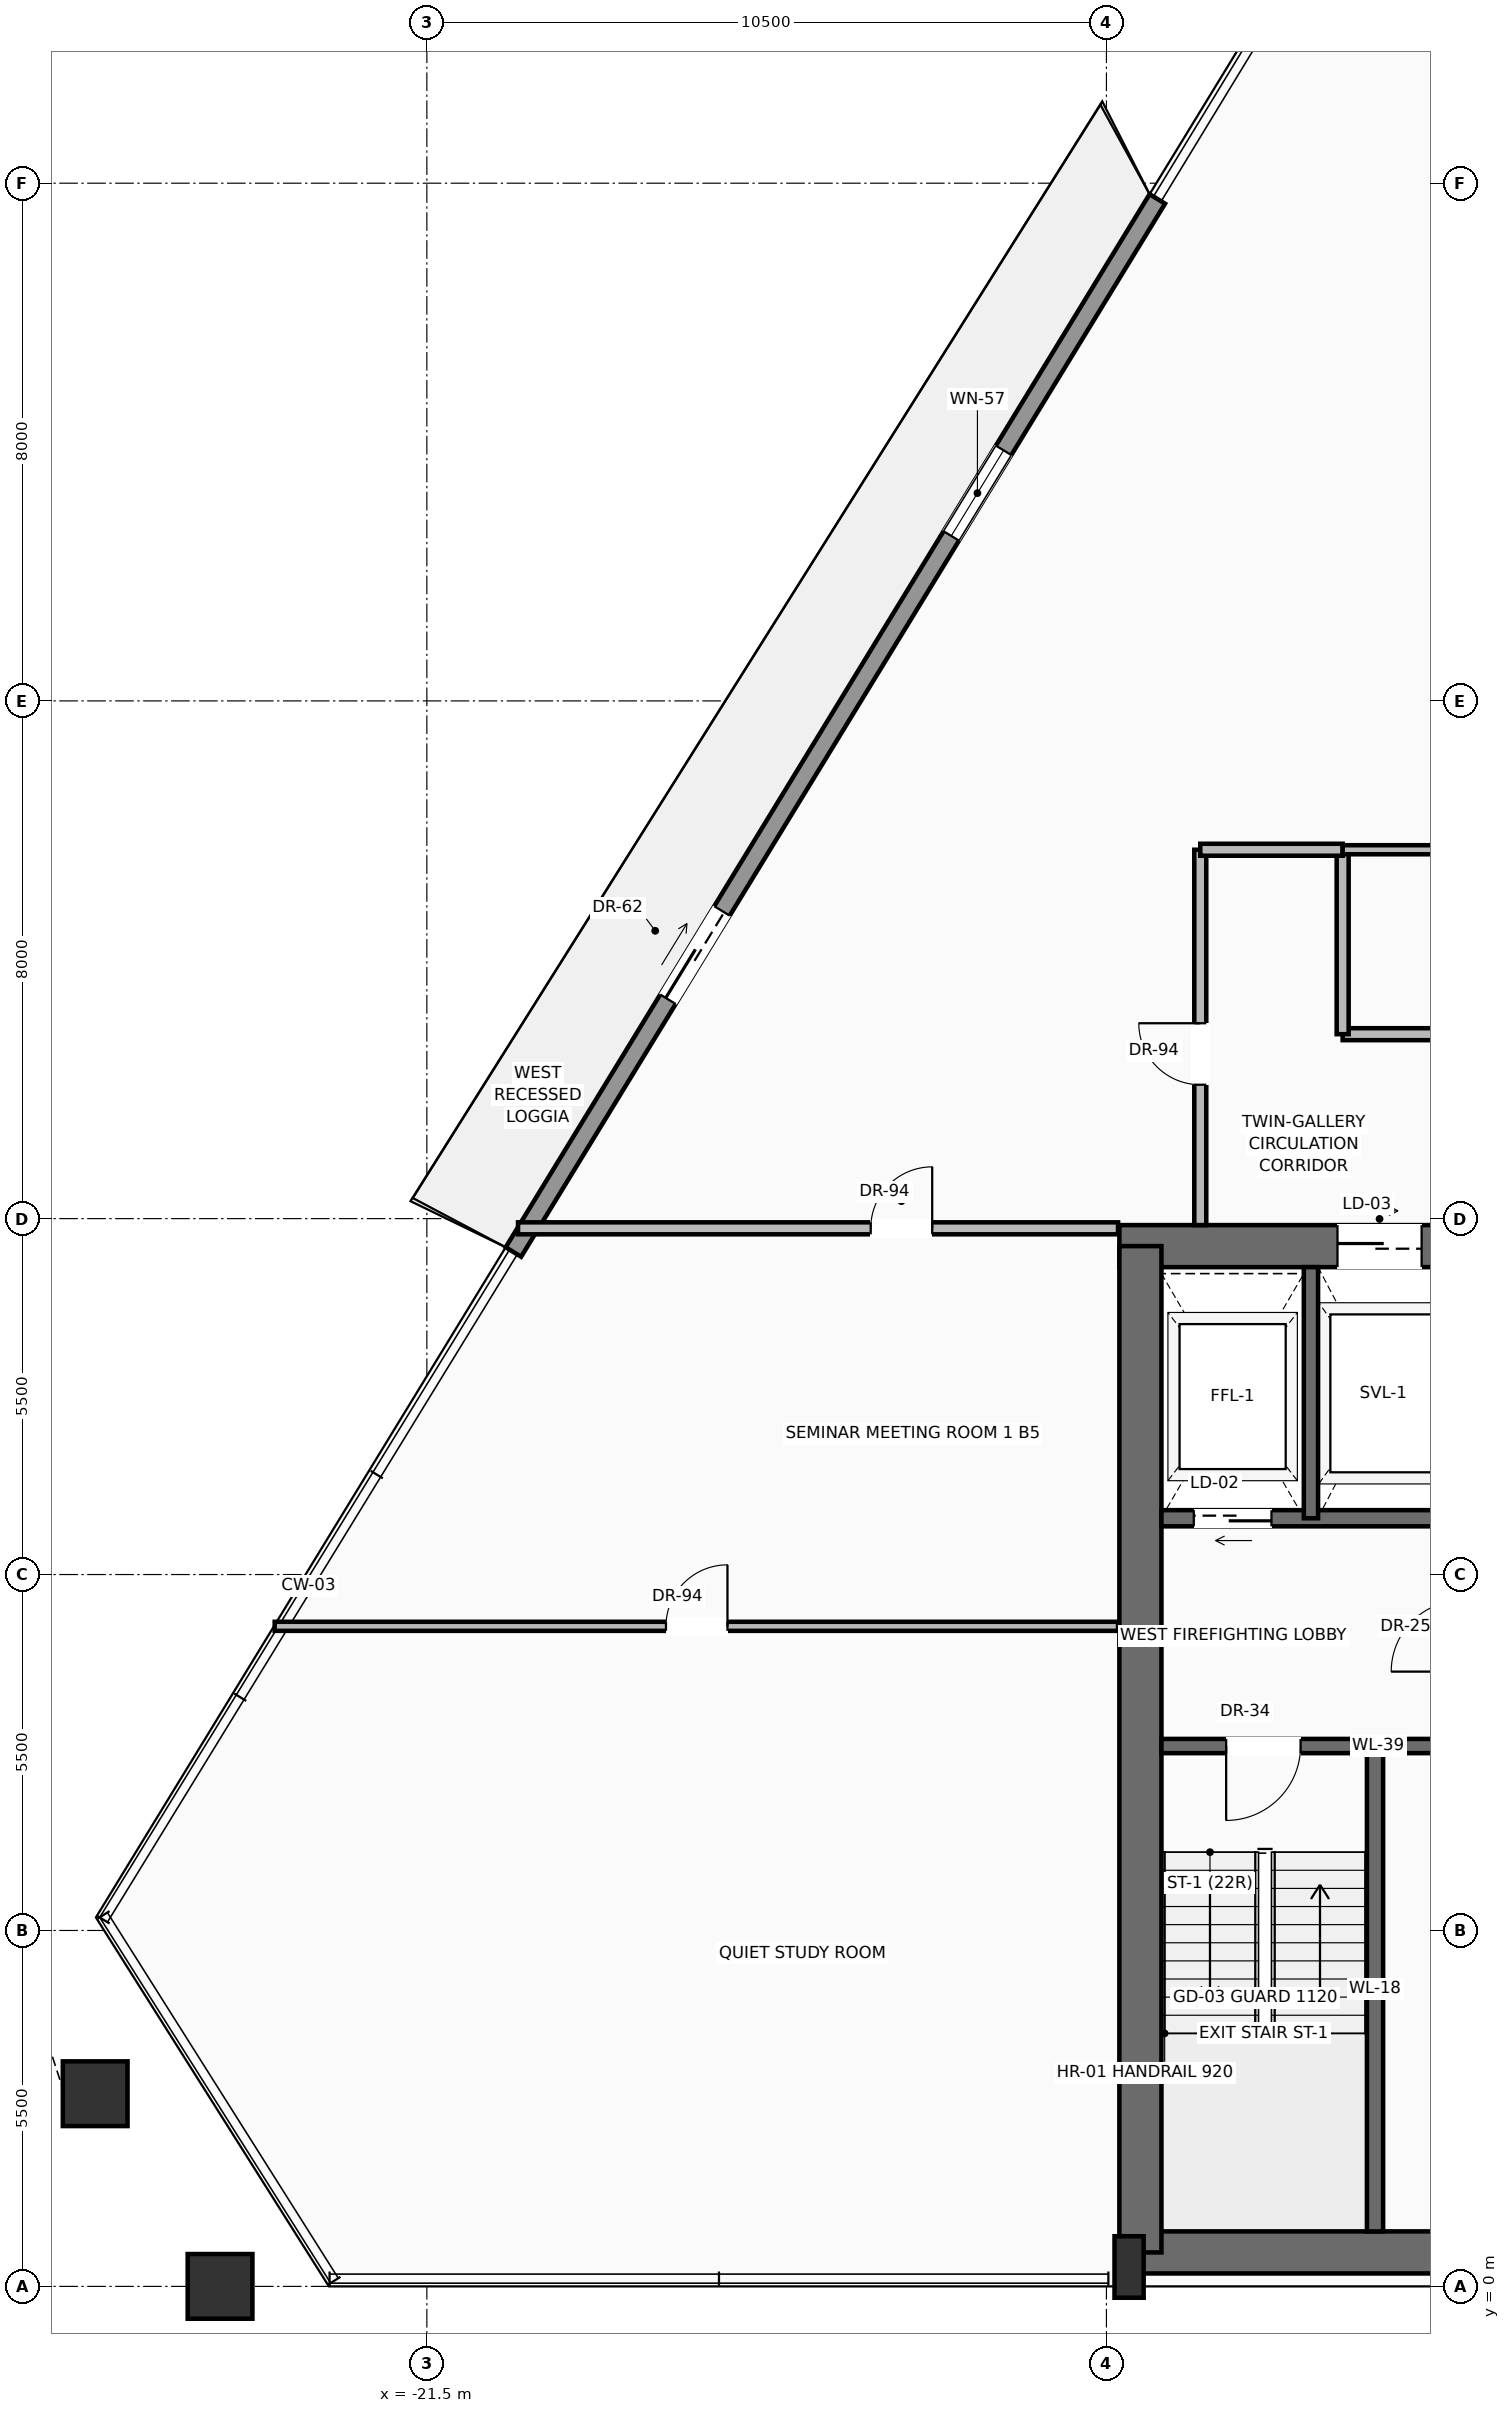
"""IFC4 building model, lengths in metres.
Left out: names, types, materials, properties, quantities, classifications, styles, units other than length and angle.
Written with IfcOpenShell. Run it as: python <this file> out.ifc"""

import sys

from ifc_helpers import new_model, si_unit, direction, frame, frame_2d, origin, origin_2d, place, context, subcontext, project, spatial, rectangle, hollow_rectangle, extrude, source, transform, mapped, element, fill, save


model = new_model("IFC4")
c1 = context("Model", 3, precision=1e-05, world=origin(), true_north=direction((0.0, 1.0)))
c2 = subcontext(c1, "Body", "Model", "MODEL_VIEW")
j1 = project(units=[si_unit("LENGTHUNIT", "METRE"), si_unit("PLANEANGLEUNIT", "RADIAN")], contexts=[c1])
p1 = place(None, origin())
s1 = spatial("IfcSite", under=j1, at=p1, CompositionType="ELEMENT")
p2 = place(p1, origin())
s2 = spatial("IfcBuilding", under=s1, at=p2, CompositionType="ELEMENT")
p3 = place(p2, frame((0.0, 0.0, 200.6)))
s3 = spatial("IfcBuildingStorey", under=s2, at=p3, CompositionType="ELEMENT", Elevation=200.6)
p4 = place(p3, frame((-10.65, 0.525, 0.0), z_axis=(0.0, 0.0, 1.0), x_axis=(1.0, 0.0, 0.0)))
e1 = element("IfcWall", 1, at=p4, inside=s3, PredefinedType="SHEAR", context=c2, shape_type="SweptSolid", body=[
    extrude(rectangle(XDim=21.3, YDim=0.65, at=frame_2d((10.65, 0.0))), origin(), (0.0, 0.0, 1.0), 3.47),
])
p5 = place(p3, frame((-10.8, 16.075, 0.0), z_axis=(0.0, 0.0, 1.0), x_axis=(1.0, 0.0, 0.0)))
e2 = element("IfcWall", 2, at=p5, inside=s3, PredefinedType="SHEAR", context=c2, shape_type="SweptSolid", body=[
    extrude(rectangle(XDim=21.6, YDim=0.65, at=frame_2d((10.8, 0.0))), origin(), (0.0, 0.0, 1.0), 3.47),
])
p6 = place(p5, frame((3.37, 0.0, 0.0)))
e3 = element("IfcOpeningElement", 3, at=p6, cuts=e2, PredefinedType="OPENING", context=c2, shape_type="SweptSolid", body=[
    extrude(rectangle(XDim=1.3, YDim=2.3, at=frame_2d((0.65, 1.15))), frame((0.0, 0.335, 0.0), z_axis=(0.0, -1.0, 0.0), x_axis=(1.0, 0.0, 0.0)), (0.0, 0.0, 1.0), 0.67),
])
p7 = place(p5, frame((9.8, 0.0, 0.0)))
e4 = element("IfcOpeningElement", 4, at=p7, cuts=e2, PredefinedType="OPENING", context=c2, shape_type="SweptSolid", body=[
    extrude(rectangle(XDim=2.0, YDim=2.4, at=frame_2d((1.0, 1.2))), frame((0.0, 0.335, 0.0), z_axis=(0.0, -1.0, 0.0), x_axis=(1.0, 0.0, 0.0)), (0.0, 0.0, 1.0), 0.67),
])
p8 = place(p3, frame((-10.475, 0.525, 0.0), z_axis=(0.0, 0.0, 1.0), x_axis=(0.0, 1.0, 0.0)))
e5 = element("IfcWall", 5, at=p8, inside=s3, PredefinedType="SHEAR", context=c2, shape_type="SweptSolid", body=[
    extrude(rectangle(XDim=15.55, YDim=0.65, at=frame_2d((7.775, 0.0))), origin(), (0.0, 0.0, 1.0), 3.47),
])
m1 = source(origin(), c2, "Body", "SweptSolid", [
    extrude(rectangle(XDim=0.45, YDim=0.95, at=origin_2d()), origin(), (0.0, 0.0, 1.0), 3.7),
])
p9 = place(p3, frame((-10.65, 0.3, 0.0), z_axis=(0.0, 0.0, 1.0), x_axis=(1.0, 0.0, 0.0)))
e6 = element("IfcColumn", 6, at=p9, inside=s3, PredefinedType="PILASTER", context=c2, shape_type="MappedRepresentation", body=[
    mapped(m1, transform((0.0, 0.0, 0.0), scale=1.0)),
])
m2 = source(origin(), c2, "Body", "SweptSolid", [
    extrude(hollow_rectangle(XDim=1.0, YDim=1.0, WallThickness=0.05, at=origin_2d()), origin(), (0.0, 0.0, 1.0), 3.691),
])
p10 = place(p3, frame((-24.695, 0.0, 0.004), z_axis=(-0.006018807573, 0.0, 0.999981886814), x_axis=(0.0, -1.0, 0.0)))
e7 = element("IfcColumn", 7, at=p10, inside=s3, PredefinedType="COLUMN", context=c2, shape_type="MappedRepresentation", body=[
    mapped(m2, transform((0.0, 0.0, 0.0), scale=1.0)),
])
m3 = source(origin(), c2, "Body", "SweptSolid", [
    extrude(hollow_rectangle(XDim=1.0, YDim=1.0, WallThickness=0.05, at=origin_2d()), origin(), (0.0, 0.0, 1.0), 3.692),
])
p11 = place(p3, frame((-26.625, 2.977, 0.004), z_axis=(0.004364825843, -0.015144623, 0.99987578663), x_axis=(0.960888031149, 0.276937161816, 0.0)))
e8 = element("IfcColumn", 8, at=p11, inside=s3, PredefinedType="COLUMN", context=c2, shape_type="MappedRepresentation", body=[
    mapped(m3, transform((0.0, 0.0, 0.0), scale=1.0)),
])
p12 = place(p3, frame((-20.163, 15.984, 0.0), z_axis=(0.0, 0.0, 1.0), x_axis=(0.521623449413, 0.853175818353, 0.0)))
e9 = element("IfcWall", 9, at=p12, inside=s3, PredefinedType="SOLIDWALL", context=c2, shape_type="SweptSolid", body=[
    extrude(rectangle(XDim=19.073, YDim=0.28, at=frame_2d((9.537, 0.0))), origin(), (0.0, 0.0, 1.0), 3.05),
])
p13 = place(p12, frame((4.578, 0.0, 0.0)))
e10 = element("IfcOpeningElement", 10, at=p13, cuts=e9, PredefinedType="OPENING", context=c2, shape_type="SweptSolid", body=[
    extrude(rectangle(XDim=1.6, YDim=2.35, at=frame_2d((0.8, 1.175))), frame((0.0, 0.15, 0.0), z_axis=(0.0, -1.0, 0.0), x_axis=(1.0, 0.0, 0.0)), (0.0, 0.0, 1.0), 0.3),
])
p14 = place(p12, frame((12.97, 0.0, 0.9)))
e11 = element("IfcOpeningElement", 11, at=p14, cuts=e9, PredefinedType="OPENING", context=c2, shape_type="SweptSolid", body=[
    extrude(rectangle(XDim=1.55, YDim=1.85, at=frame_2d((0.775, 0.925))), frame((0.0, 0.15, 0.0), z_axis=(0.0, -1.0, 0.0), x_axis=(1.0, 0.0, 0.0)), (0.0, 0.0, 1.0), 0.3),
])
p15 = place(p3, frame((-6.85, 0.85, 0.0), z_axis=(0.0, 0.0, 1.0), x_axis=(0.0, 1.0, 0.0)))
e12 = element("IfcWall", 12, at=p15, inside=s3, PredefinedType="SOLIDWALL", context=c2, shape_type="SweptSolid", body=[
    extrude(rectangle(XDim=7.5, YDim=0.25, at=frame_2d((3.75, 0.0))), origin(), (0.0, 0.0, 1.0), 3.47),
])
p16 = place(p3, frame((-5.5, 8.35, 0.0), z_axis=(0.0, 0.0, 1.0), x_axis=(-1.0, 0.0, 0.0)))
e13 = element("IfcWall", 13, at=p16, inside=s3, PredefinedType="SOLIDWALL", context=c2, shape_type="SweptSolid", body=[
    extrude(rectangle(XDim=4.65, YDim=0.22, at=frame_2d((2.325, 0.0))), origin(), (0.0, 0.0, 1.0), 3.47),
])
p17 = place(p16, frame((2.5, 0.0, 0.0)))
e14 = element("IfcOpeningElement", 14, at=p17, cuts=e13, PredefinedType="OPENING", context=c2, shape_type="SweptSolid", body=[
    extrude(rectangle(XDim=1.15, YDim=2.2, at=frame_2d((0.575, 1.1))), frame((0.0, 0.12, 0.0), z_axis=(0.0, -1.0, 0.0), x_axis=(1.0, 0.0, 0.0)), (0.0, 0.0, 1.0), 0.24),
])
p18 = place(p3, frame((-5.5, 11.87, 0.0), z_axis=(0.0, 0.0, 1.0), x_axis=(-1.0, 0.0, 0.0)))
e15 = element("IfcWall", 15, at=p18, inside=s3, PredefinedType="SOLIDWALL", context=c2, shape_type="SweptSolid", body=[
    extrude(rectangle(XDim=4.65, YDim=0.25, at=frame_2d((2.325, 0.0))), origin(), (0.0, 0.0, 1.0), 3.47),
])
p19 = place(p18, frame((2.95, 0.0, 0.0)))
e16 = element("IfcOpeningElement", 16, at=p19, cuts=e15, PredefinedType="OPENING", context=c2, shape_type="SweptSolid", body=[
    extrude(rectangle(XDim=1.2, YDim=2.25, at=frame_2d((0.6, 1.125))), frame((0.0, 0.135, 0.0), z_axis=(0.0, -1.0, 0.0), x_axis=(1.0, 0.0, 0.0)), (0.0, 0.0, 1.0), 0.27),
])
p20 = place(p3, frame((-7.84, 11.87, 0.0), z_axis=(0.0, 0.0, 1.0), x_axis=(0.0, 1.0, 0.0)))
e17 = element("IfcWall", 17, at=p20, inside=s3, PredefinedType="SOLIDWALL", context=c2, shape_type="SweptSolid", body=[
    extrude(rectangle(XDim=3.88, YDim=0.22, at=frame_2d((1.94, 0.0))), origin(), (0.0, 0.0, 1.0), 3.47),
])
p21 = place(p3, frame((-7.35, 19.35, 0.0), z_axis=(0.0, 0.0, 1.0), x_axis=(1.0, 0.0, 0.0)))
e18 = element("IfcWall", 18, at=p21, inside=s3, PredefinedType="PARTITIONING", context=c2, shape_type="SweptSolid", body=[
    extrude(rectangle(XDim=14.2, YDim=0.185, at=frame_2d((7.1, 0.0))), origin(), (0.0, 0.0, 1.0), 2.846),
])
p22 = place(p21, frame((6.625, 0.0, 0.0)))
e19 = element("IfcOpeningElement", 19, at=p22, cuts=e18, PredefinedType="OPENING", context=c2, shape_type="SweptSolid", body=[
    extrude(rectangle(XDim=0.95, YDim=2.2, at=frame_2d((0.475, 1.1))), frame((0.0, 0.103, 0.0), z_axis=(0.0, -1.0, 0.0), x_axis=(1.0, 0.0, 0.0)), (0.0, 0.0, 1.0), 0.205),
])
p23 = place(p3, frame((-7.35, 19.35, 0.0), z_axis=(0.0, 0.0, 1.0), x_axis=(0.0, 1.0, 0.0)))
e20 = element("IfcWall", 20, at=p23, inside=s3, PredefinedType="PARTITIONING", context=c2, shape_type="SweptSolid", body=[
    extrude(rectangle(XDim=2.85, YDim=0.185, at=frame_2d((1.425, 0.0))), origin(), (0.0, 0.0, 1.0), 3.462),
])
p24 = place(p3, frame((-9.55, 16.4, 0.0), z_axis=(0.0, 0.0, 1.0), x_axis=(0.0, 1.0, 0.0)))
e21 = element("IfcWall", 21, at=p24, inside=s3, PredefinedType="PARTITIONING", context=c2, shape_type="SweptSolid", body=[
    extrude(rectangle(XDim=5.8, YDim=0.185, at=frame_2d((2.9, 0.0))), origin(), (0.0, 0.0, 1.0), 3.462),
])
p25 = place(p24, frame((2.169, 0.0, 0.0)))
e22 = element("IfcOpeningElement", 22, at=p25, cuts=e21, PredefinedType="OPENING", context=c2, shape_type="SweptSolid", body=[
    extrude(rectangle(XDim=0.95, YDim=2.2, at=frame_2d((0.475, 1.1))), frame((0.0, 0.103, 0.0), z_axis=(0.0, -1.0, 0.0), x_axis=(1.0, 0.0, 0.0)), (0.0, 0.0, 1.0), 0.205),
])
p26 = place(p3, frame((-9.55, 22.2, 0.0), z_axis=(0.0, 0.0, 1.0), x_axis=(1.0, 0.0, 0.0)))
e23 = element("IfcWall", 23, at=p26, inside=s3, PredefinedType="PARTITIONING", context=c2, shape_type="SweptSolid", body=[
    extrude(rectangle(XDim=2.2, YDim=0.185, at=frame_2d((1.1, 0.0))), origin(), (0.0, 0.0, 1.0), 3.049),
])
p27 = place(p3, frame((-20.091, 16.35, 0.0), z_axis=(0.0, 0.0, 1.0), x_axis=(1.0, 0.0, 0.0)))
e24 = element("IfcWall", 24, at=p27, inside=s3, PredefinedType="PARTITIONING", context=c2, shape_type="SweptSolid", body=[
    extrude(rectangle(XDim=9.271, YDim=0.185, at=frame_2d((4.636, 0.0))), origin(), (0.0, 0.0, 1.0), 3.462),
])
p28 = place(p27, frame((5.449, 0.0, 0.0)))
e25 = element("IfcOpeningElement", 25, at=p28, cuts=e24, PredefinedType="OPENING", context=c2, shape_type="SweptSolid", body=[
    extrude(rectangle(XDim=0.95, YDim=2.2, at=frame_2d((0.475, 1.1))), frame((0.0, 0.103, 0.0), z_axis=(0.0, -1.0, 0.0), x_axis=(1.0, 0.0, 0.0)), (0.0, 0.0, 1.0), 0.205),
])
p29 = place(p3, frame((-7.35, 22.2, 0.0), z_axis=(0.0, 0.0, 1.0), x_axis=(1.0, 0.0, 0.0)))
e26 = element("IfcWall", 26, at=p29, inside=s3, PredefinedType="PARTITIONING", context=c2, shape_type="SweptSolid", body=[
    extrude(rectangle(XDim=14.2, YDim=0.14, at=frame_2d((7.1, 0.0))), origin(), (0.0, 0.0, 1.0), 3.049),
])
p30 = place(p29, frame((6.863, 0.0, 0.0)))
e27 = element("IfcOpeningElement", 27, at=p30, cuts=e26, PredefinedType="OPENING", context=c2, shape_type="SweptSolid", body=[
    extrude(rectangle(XDim=0.95, YDim=2.2, at=frame_2d((0.475, 1.1))), frame((0.0, 0.08, 0.0), z_axis=(0.0, -1.0, 0.0), x_axis=(1.0, 0.0, 0.0)), (0.0, 0.0, 1.0), 0.16),
])
p31 = place(p3, frame((-23.851, 10.2, 0.0), z_axis=(0.0, 0.0, 1.0), x_axis=(1.0, 0.0, 0.0)))
e28 = element("IfcWall", 28, at=p31, inside=s3, PredefinedType="PARTITIONING", context=c2, shape_type="SweptSolid", body=[
    extrude(rectangle(XDim=13.031, YDim=0.14, at=frame_2d((6.516, 0.0))), origin(), (0.0, 0.0, 1.0), 3.462),
])
p32 = place(p31, frame((6.046, 0.0, 0.0)))
e29 = element("IfcOpeningElement", 29, at=p32, cuts=e28, PredefinedType="OPENING", context=c2, shape_type="SweptSolid", body=[
    extrude(rectangle(XDim=0.95, YDim=2.2, at=frame_2d((0.475, 1.1))), frame((0.0, 0.08, 0.0), z_axis=(0.0, -1.0, 0.0), x_axis=(1.0, 0.0, 0.0)), (0.0, 0.0, 1.0), 0.16),
])
m4 = source(origin(), c2, "Body", "SweptSolid", [
    extrude(rectangle(XDim=1.6, YDim=2.35, at=frame_2d((0.8, 1.175))), frame((0.0, 0.025, 0.0), z_axis=(0.0, -1.0, 0.0), x_axis=(1.0, 0.0, 0.0)), (0.0, 0.0, 1.0), 0.05),
])
p33 = place(p13, origin())
e30 = element("IfcDoor", 30, at=p33, inside=s3, OperationType="SLIDING_TO_LEFT", PredefinedType="DOOR", context=c2, shape_type="MappedRepresentation", body=[
    mapped(m4, transform((0.0, 0.0, 0.0), scale=1.0)),
])
fill(e10, e30)
m5 = source(origin(), c2, "Body", "SweptSolid", [
    extrude(rectangle(XDim=1.55, YDim=1.85, at=frame_2d((0.775, 0.925))), frame((0.0, 0.03, 0.0), z_axis=(0.0, -1.0, 0.0), x_axis=(1.0, 0.0, 0.0)), (0.0, 0.0, 1.0), 0.06),
])
p34 = place(p14, origin())
e31 = element("IfcWindow", 31, at=p34, inside=s3, PartitioningType="SINGLE_PANEL", PredefinedType="WINDOW", context=c2, shape_type="MappedRepresentation", body=[
    mapped(m5, transform((0.0, 0.0, 0.0), scale=1.0)),
])
fill(e11, e31)
m6 = source(origin(), c2, "Body", "SweptSolid", [
    extrude(rectangle(XDim=1.15, YDim=2.2, at=frame_2d((0.575, 1.1))), frame((0.0, 0.025, 0.0), z_axis=(0.0, -1.0, 0.0), x_axis=(1.0, 0.0, 0.0)), (0.0, 0.0, 1.0), 0.05),
])
p35 = place(p17, origin())
e32 = element("IfcDoor", 32, at=p35, inside=s3, OperationType="SINGLE_SWING_RIGHT", PredefinedType="DOOR", context=c2, shape_type="MappedRepresentation", body=[
    mapped(m6, transform((0.0, 0.0, 0.0), scale=1.0)),
])
fill(e14, e32)
m7 = source(origin(), c2, "Body", "SweptSolid", [
    extrude(rectangle(XDim=1.2, YDim=2.25, at=frame_2d((0.6, 1.125))), frame((0.0, 0.025, 0.0), z_axis=(0.0, -1.0, 0.0), x_axis=(1.0, 0.0, 0.0)), (0.0, 0.0, 1.0), 0.05),
])
p36 = place(p19, origin())
e33 = element("IfcDoor", 33, at=p36, inside=s3, OperationType="SLIDING_TO_LEFT", PredefinedType="DOOR", context=c2, shape_type="MappedRepresentation", body=[
    mapped(m7, transform((0.0, 0.0, 0.0), scale=1.0)),
])
fill(e16, e33)
m8 = source(origin(), c2, "Body", "SweptSolid", [
    extrude(rectangle(XDim=1.3, YDim=2.3, at=frame_2d((0.65, 1.15))), frame((0.0, 0.025, 0.0), z_axis=(0.0, -1.0, 0.0), x_axis=(1.0, 0.0, 0.0)), (0.0, 0.0, 1.0), 0.05),
])
p37 = place(p6, origin())
e34 = element("IfcDoor", 34, at=p37, inside=s3, OperationType="SLIDING_TO_RIGHT", PredefinedType="DOOR", context=c2, shape_type="MappedRepresentation", body=[
    mapped(m8, transform((0.0, 0.0, 0.0), scale=1.0)),
])
fill(e3, e34)
m9 = source(origin(), c2, "Body", "SweptSolid", [
    extrude(rectangle(XDim=0.95, YDim=2.2, at=frame_2d((0.475, 1.1))), frame((0.0, 0.025, 0.0), z_axis=(0.0, -1.0, 0.0), x_axis=(1.0, 0.0, 0.0)), (0.0, 0.0, 1.0), 0.05),
])
p38 = place(p25, origin())
e35 = element("IfcDoor", 35, at=p38, inside=s3, OperationType="SINGLE_SWING_RIGHT", PredefinedType="DOOR", context=c2, shape_type="MappedRepresentation", body=[
    mapped(m9, transform((0.0, 0.0, 0.0), scale=1.0)),
])
fill(e22, e35)
p39 = place(p28, origin())
e36 = element("IfcDoor", 36, at=p39, inside=s3, OperationType="SINGLE_SWING_RIGHT", PredefinedType="DOOR", context=c2, shape_type="MappedRepresentation", body=[
    mapped(m9, transform((0.0, 0.0, 0.0), scale=1.0)),
])
fill(e25, e36)
p40 = place(p32, origin())
e37 = element("IfcDoor", 37, at=p40, inside=s3, OperationType="SINGLE_SWING_RIGHT", PredefinedType="DOOR", context=c2, shape_type="MappedRepresentation", body=[
    mapped(m9, transform((0.0, 0.0, 0.0), scale=1.0)),
])
fill(e29, e37)
save(model, sys.argv[1])
